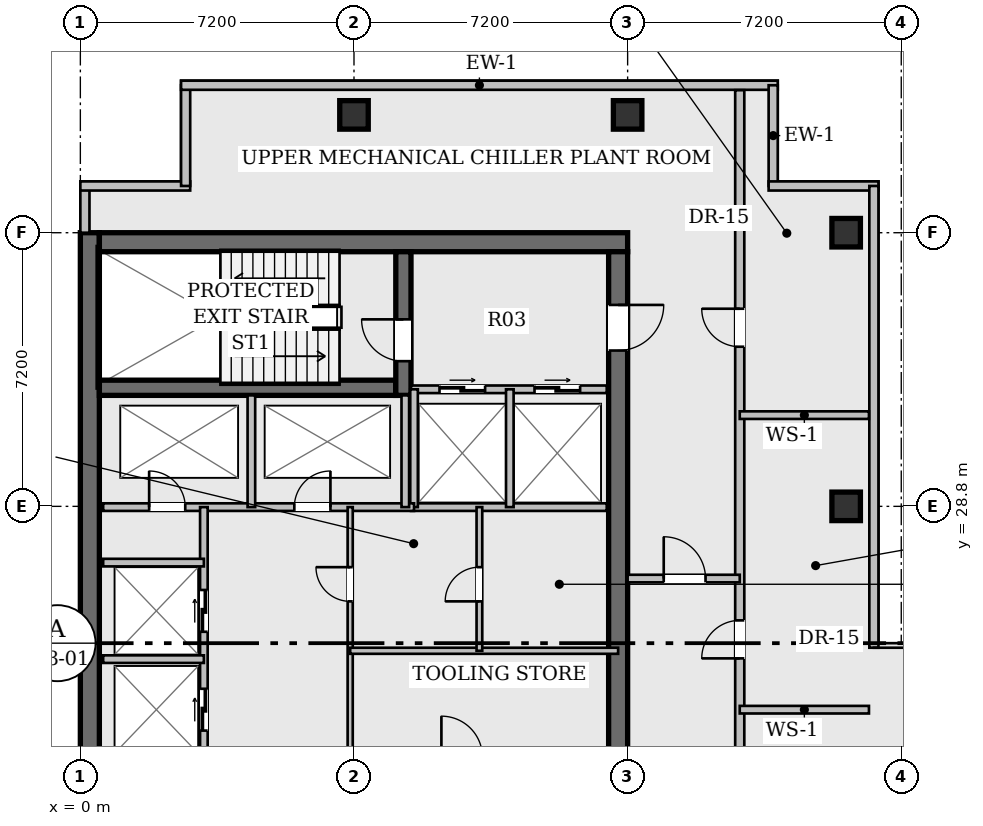
"""IFC4 building model, lengths in metres.
Left out: names, types, materials, properties, quantities, classifications, styles, units other than length and angle.
Written with IfcOpenShell. Run it as: python <this file> out.ifc"""

import sys

from ifc_helpers import new_model, si_unit, direction, frame, frame_2d, origin, origin_2d, place, context, subcontext, project, spatial, rectangle, hollow_rectangle, extrude, element, fill, save


model = new_model("IFC4")
c1 = context("Model", 3, precision=1e-05, world=origin(), true_north=direction((0.0, 1.0)))
c2 = subcontext(c1, "Body", "Model", "MODEL_VIEW")
j1 = project(units=[si_unit("LENGTHUNIT", "METRE"), si_unit("PLANEANGLEUNIT", "RADIAN")], contexts=[c1])
p1 = place(None, origin())
s1 = spatial("IfcSite", under=j1, at=p1, CompositionType="ELEMENT")
p2 = place(p1, origin())
s2 = spatial("IfcBuilding", under=s1, at=p2, CompositionType="ELEMENT")
p3 = place(p2, frame((0.0, 0.0, 236.95)))
s3 = spatial("IfcBuildingStorey", under=s2, at=p3, CompositionType="ELEMENT", Elevation=236.95)
p4 = place(p3, frame((0.25, 7.2, 0.0), z_axis=(0.0, 0.0, 1.0), x_axis=(0.0, 1.0, 0.0)))
e1 = element("IfcWall", 1, at=p4, inside=s3, PredefinedType="SHEAR", context=c2, shape_type="SweptSolid", body=[
    extrude(rectangle(XDim=28.8, YDim=0.5, at=frame_2d((14.4, 0.0))), origin(), (0.0, 0.0, 1.0), 3.94),
])
p5 = place(p3, frame((0.5, 35.75, 0.0), z_axis=(0.0, 0.0, 1.0), x_axis=(1.0, 0.0, 0.0)))
e2 = element("IfcWall", 2, at=p5, inside=s3, PredefinedType="SHEAR", context=c2, shape_type="SweptSolid", body=[
    extrude(rectangle(XDim=13.9, YDim=0.5, at=frame_2d((6.95, 0.0))), origin(), (0.0, 0.0, 1.0), 3.94),
])
p6 = place(p3, frame((14.15, 35.5, 0.0), z_axis=(0.0, 0.0, 1.0), x_axis=(0.0, -1.0, 0.0)))
e3 = element("IfcWall", 3, at=p6, inside=s3, PredefinedType="SHEAR", context=c2, shape_type="SweptSolid", body=[
    extrude(rectangle(XDim=27.8, YDim=0.5, at=frame_2d((13.9, 0.0))), origin(), (0.0, 0.0, 1.0), 3.94),
])
p7 = place(p6, frame((1.4, 0.0, 0.0)))
e4 = element("IfcOpeningElement", 4, at=p7, cuts=e3, PredefinedType="OPENING", context=c2, shape_type="SweptSolid", body=[
    extrude(rectangle(XDim=1.2, YDim=2.15, at=frame_2d((0.6, 1.075))), frame((0.0, 0.262, 0.0), z_axis=(0.0, -1.0, 0.0), x_axis=(1.0, 0.0, 0.0)), (0.0, 0.0, 1.0), 0.524),
])
p8 = place(p6, frame((25.35, 0.0, 0.0)))
e5 = element("IfcOpeningElement", 5, at=p8, cuts=e3, PredefinedType="OPENING", context=c2, shape_type="SweptSolid", body=[
    extrude(rectangle(XDim=1.2, YDim=2.15, at=frame_2d((0.6, 1.075))), frame((0.0, 0.262, 0.0), z_axis=(0.0, -1.0, 0.0), x_axis=(1.0, 0.0, 0.0)), (0.0, 0.0, 1.0), 0.524),
])
p9 = place(p6, frame((14.7, 0.0, 0.0)))
e6 = element("IfcOpeningElement", 6, at=p9, cuts=e3, PredefinedType="OPENING", context=c2, shape_type="SweptSolid", body=[
    extrude(rectangle(XDim=1.6, YDim=2.2, at=frame_2d((0.8, 1.1))), frame((0.0, 0.262, 0.0), z_axis=(0.0, -1.0, 0.0), x_axis=(1.0, 0.0, 0.0)), (0.0, 0.0, 1.0), 0.524),
])
p10 = place(p3, frame((0.5, 31.92, 0.0), z_axis=(0.0, 0.0, 1.0), x_axis=(1.0, 0.0, 0.0)))
e7 = element("IfcWall", 7, at=p10, inside=s3, PredefinedType="SHEAR", context=c2, shape_type="SweptSolid", body=[
    extrude(rectangle(XDim=7.8, YDim=0.4, at=frame_2d((3.9, 0.0))), origin(), (0.0, 0.0, 1.0), 3.94),
])
p11 = place(p3, frame((8.5, 31.72, 0.0), z_axis=(0.0, 0.0, 1.0), x_axis=(0.0, 1.0, 0.0)))
e8 = element("IfcWall", 8, at=p11, inside=s3, PredefinedType="SHEAR", context=c2, shape_type="SweptSolid", body=[
    extrude(rectangle(XDim=3.78, YDim=0.4, at=frame_2d((1.89, 0.0))), origin(), (0.0, 0.0, 1.0), 3.94),
])
p12 = place(p11, frame((0.9, 0.0, 0.0)))
e9 = element("IfcOpeningElement", 9, at=p12, cuts=e8, PredefinedType="OPENING", context=c2, shape_type="SweptSolid", body=[
    extrude(rectangle(XDim=1.1, YDim=2.15, at=frame_2d((0.55, 1.075))), frame((0.0, 0.212, 0.0), z_axis=(0.0, -1.0, 0.0), x_axis=(1.0, 0.0, 0.0)), (0.0, 0.0, 1.0), 0.424),
])
for number, where, z_axis, x_axis in (
    (10, (7.2, 39.1, 0.0), (0.0, 0.0, 1.0), (1.0, 0.0, 0.0)),
    (11, (14.4, 39.1, 0.0), (0.0, 0.0, 1.0), (1.0, 0.0, 0.0)),
    (12, (20.15, 28.8, 0.0), (0.0, 0.0, 1.0), (1.0, 0.0, 0.0)),
    (13, (20.15, 36.0, 0.0), (0.0, 0.0, 1.0), (1.0, 0.0, 0.0)),
):
    element("IfcColumn", number, at=place(p3, frame(where, z_axis=z_axis, x_axis=x_axis)), inside=s3, PredefinedType="COLUMN", context=c2, shape_type="SweptSolid", body=[
        extrude(hollow_rectangle(XDim=0.75, YDim=0.75, WallThickness=0.045, at=origin_2d()), origin(), (0.0, 0.0, 1.0), 3.94),
    ])
p13 = place(p3, frame((0.12, 36.0, 0.0), z_axis=(0.0, 0.0, 1.0), x_axis=(0.0, 1.0, 0.0)))
e14 = element("IfcWall", 14, at=p13, inside=s3, PredefinedType="STANDARD", context=c2, shape_type="SweptSolid", body=[
    extrude(rectangle(XDim=1.23, YDim=0.24, at=frame_2d((0.615, 0.0))), origin(), (0.0, 0.0, 1.0), 3.94),
])
p14 = place(p3, frame((0.0, 37.23, 0.0), z_axis=(0.0, 0.0, 1.0), x_axis=(1.0, 0.0, 0.0)))
e15 = element("IfcWall", 15, at=p14, inside=s3, PredefinedType="STANDARD", context=c2, shape_type="SweptSolid", body=[
    extrude(rectangle(XDim=2.89, YDim=0.24, at=frame_2d((1.445, 0.0))), origin(), (0.0, 0.0, 1.0), 3.94),
])
p15 = place(p3, frame((2.77, 37.23, 0.0), z_axis=(0.0, 0.0, 1.0), x_axis=(0.0, 1.0, 0.0)))
e16 = element("IfcWall", 16, at=p15, inside=s3, PredefinedType="STANDARD", context=c2, shape_type="SweptSolid", body=[
    extrude(rectangle(XDim=2.65, YDim=0.24, at=frame_2d((1.325, 0.0))), origin(), (0.0, 0.0, 1.0), 3.94),
])
p16 = place(p3, frame((2.65, 39.88, 0.0), z_axis=(0.0, 0.0, 1.0), x_axis=(1.0, 0.0, 0.0)))
e17 = element("IfcWall", 17, at=p16, inside=s3, PredefinedType="STANDARD", context=c2, shape_type="SweptSolid", body=[
    extrude(rectangle(XDim=15.7, YDim=0.24, at=frame_2d((7.85, 0.0))), origin(), (0.0, 0.0, 1.0), 3.94),
])
p17 = place(p3, frame((18.23, 39.88, 0.0), z_axis=(0.0, 0.0, 1.0), x_axis=(0.0, -1.0, 0.0)))
e18 = element("IfcWall", 18, at=p17, inside=s3, PredefinedType="STANDARD", context=c2, shape_type="SweptSolid", body=[
    extrude(rectangle(XDim=2.65, YDim=0.24, at=frame_2d((1.325, 0.0))), origin(), (0.0, 0.0, 1.0), 3.94),
])
p18 = place(p3, frame((18.11, 37.23, 0.0), z_axis=(0.0, 0.0, 1.0), x_axis=(1.0, 0.0, 0.0)))
e19 = element("IfcWall", 19, at=p18, inside=s3, PredefinedType="STANDARD", context=c2, shape_type="SweptSolid", body=[
    extrude(rectangle(XDim=2.89, YDim=0.24, at=frame_2d((1.445, 0.0))), origin(), (0.0, 0.0, 1.0), 3.94),
])
p19 = place(p3, frame((20.88, 37.23, 0.0), z_axis=(0.0, 0.0, 1.0), x_axis=(0.0, -1.0, 0.0)))
e20 = element("IfcWall", 20, at=p19, inside=s3, PredefinedType="STANDARD", context=c2, shape_type="SweptSolid", body=[
    extrude(rectangle(XDim=12.15, YDim=0.24, at=frame_2d((6.075, 0.0))), origin(), (0.0, 0.0, 1.0), 3.94),
])
p20 = place(p3, frame((8.7, 31.88, 0.0), z_axis=(0.0, 0.0, 1.0), x_axis=(1.0, 0.0, 0.0)))
e21 = element("IfcWall", 21, at=p20, inside=s3, PredefinedType="PARTITIONING", context=c2, shape_type="SweptSolid", body=[
    extrude(rectangle(XDim=5.15, YDim=0.2, at=frame_2d((2.575, 0.0))), origin(), (0.0, 0.0, 1.0), 3.94),
])
p21 = place(p20, frame((0.75, 0.0, 0.0)))
e22 = element("IfcOpeningElement", 22, at=p21, cuts=e21, PredefinedType="OPENING", context=c2, shape_type="SweptSolid", body=[
    extrude(rectangle(XDim=1.2, YDim=2.2, at=frame_2d((0.6, 1.1))), frame((0.0, 0.112, 0.0), z_axis=(0.0, -1.0, 0.0), x_axis=(1.0, 0.0, 0.0)), (0.0, 0.0, 1.0), 0.224),
])
p22 = place(p20, frame((3.25, 0.0, 0.0)))
e23 = element("IfcOpeningElement", 23, at=p22, cuts=e21, PredefinedType="OPENING", context=c2, shape_type="SweptSolid", body=[
    extrude(rectangle(XDim=1.2, YDim=2.2, at=frame_2d((0.6, 1.1))), frame((0.0, 0.112, 0.0), z_axis=(0.0, -1.0, 0.0), x_axis=(1.0, 0.0, 0.0)), (0.0, 0.0, 1.0), 0.224),
])
p23 = place(p3, frame((8.7, 28.78, 0.0), z_axis=(0.0, 0.0, 1.0), x_axis=(1.0, 0.0, 0.0)))
e24 = element("IfcWall", 24, at=p23, inside=s3, PredefinedType="PARTITIONING", context=c2, shape_type="SweptSolid", body=[
    extrude(rectangle(XDim=5.15, YDim=0.2, at=frame_2d((2.575, 0.0))), origin(), (0.0, 0.0, 1.0), 3.94),
])
for number, where, z_axis, x_axis in (
    (25, (8.78, 28.78, 0.0), (0.0, 0.0, 1.0), (0.0, 1.0, 0.0)),
    (26, (11.3, 28.78, 0.0), (0.0, 0.0, 1.0), (0.0, 1.0, 0.0)),
):
    element("IfcWall", number, at=place(p3, frame(where, z_axis=z_axis, x_axis=x_axis)), inside=s3, PredefinedType="PARTITIONING", context=c2, shape_type="SweptSolid", body=[
        extrude(rectangle(XDim=3.1, YDim=0.2, at=frame_2d((1.55, 0.0))), origin(), (0.0, 0.0, 1.0), 3.94),
    ])
p24 = place(p3, frame((0.6, 28.78, 0.0), z_axis=(0.0, 0.0, 1.0), x_axis=(1.0, 0.0, 0.0)))
e27 = element("IfcWall", 27, at=p24, inside=s3, PredefinedType="PARTITIONING", context=c2, shape_type="SweptSolid", body=[
    extrude(rectangle(XDim=8.18, YDim=0.2, at=frame_2d((4.09, 0.0))), origin(), (0.0, 0.0, 1.0), 3.94),
])
p25 = place(p24, frame((1.21, 0.0, 0.0)))
e28 = element("IfcOpeningElement", 28, at=p25, cuts=e27, PredefinedType="OPENING", context=c2, shape_type="SweptSolid", body=[
    extrude(rectangle(XDim=0.95, YDim=2.15, at=frame_2d((0.475, 1.075))), frame((0.0, 0.112, 0.0), z_axis=(0.0, -1.0, 0.0), x_axis=(1.0, 0.0, 0.0)), (0.0, 0.0, 1.0), 0.224),
])
p26 = place(p24, frame((5.03, 0.0, 0.0)))
e29 = element("IfcOpeningElement", 29, at=p26, cuts=e27, PredefinedType="OPENING", context=c2, shape_type="SweptSolid", body=[
    extrude(rectangle(XDim=0.95, YDim=2.15, at=frame_2d((0.475, 1.075))), frame((0.0, 0.112, 0.0), z_axis=(0.0, -1.0, 0.0), x_axis=(1.0, 0.0, 0.0)), (0.0, 0.0, 1.0), 0.224),
])
for number, where, z_axis, x_axis in (
    (30, (4.5, 28.78, 0.0), (0.0, 0.0, 1.0), (0.0, 1.0, 0.0)),
    (31, (8.55, 28.78, 0.0), (0.0, 0.0, 1.0), (0.0, 1.0, 0.0)),
):
    element("IfcWall", number, at=place(p3, frame(where, z_axis=z_axis, x_axis=x_axis)), inside=s3, PredefinedType="PARTITIONING", context=c2, shape_type="SweptSolid", body=[
        extrude(rectangle(XDim=2.94, YDim=0.2, at=frame_2d((1.47, 0.0))), origin(), (0.0, 0.0, 1.0), 3.94),
    ])
p27 = place(p3, frame((3.25, 15.7, 0.0), z_axis=(0.0, 0.0, 1.0), x_axis=(0.0, 1.0, 0.0)))
e32 = element("IfcWall", 32, at=p27, inside=s3, PredefinedType="PARTITIONING", context=c2, shape_type="SweptSolid", body=[
    extrude(rectangle(XDim=13.08, YDim=0.2, at=frame_2d((6.54, 0.0))), origin(), (0.0, 0.0, 1.0), 3.94),
])
p28 = place(p27, frame((0.9, 0.0, 0.0)))
e33 = element("IfcOpeningElement", 33, at=p28, cuts=e32, PredefinedType="OPENING", context=c2, shape_type="SweptSolid", body=[
    extrude(rectangle(XDim=1.1, YDim=2.2, at=frame_2d((0.55, 1.1))), frame((0.0, 0.112, 0.0), z_axis=(0.0, -1.0, 0.0), x_axis=(1.0, 0.0, 0.0)), (0.0, 0.0, 1.0), 0.224),
])
p29 = place(p27, frame((3.5, 0.0, 0.0)))
e34 = element("IfcOpeningElement", 34, at=p29, cuts=e32, PredefinedType="OPENING", context=c2, shape_type="SweptSolid", body=[
    extrude(rectangle(XDim=1.1, YDim=2.2, at=frame_2d((0.55, 1.1))), frame((0.0, 0.112, 0.0), z_axis=(0.0, -1.0, 0.0), x_axis=(1.0, 0.0, 0.0)), (0.0, 0.0, 1.0), 0.224),
])
p30 = place(p27, frame((7.2, 0.0, 0.0)))
e35 = element("IfcOpeningElement", 35, at=p30, cuts=e32, PredefinedType="OPENING", context=c2, shape_type="SweptSolid", body=[
    extrude(rectangle(XDim=1.1, YDim=2.2, at=frame_2d((0.55, 1.1))), frame((0.0, 0.112, 0.0), z_axis=(0.0, -1.0, 0.0), x_axis=(1.0, 0.0, 0.0)), (0.0, 0.0, 1.0), 0.224),
])
p31 = place(p27, frame((9.8, 0.0, 0.0)))
e36 = element("IfcOpeningElement", 36, at=p31, cuts=e32, PredefinedType="OPENING", context=c2, shape_type="SweptSolid", body=[
    extrude(rectangle(XDim=1.1, YDim=2.2, at=frame_2d((0.55, 1.1))), frame((0.0, 0.112, 0.0), z_axis=(0.0, -1.0, 0.0), x_axis=(1.0, 0.0, 0.0)), (0.0, 0.0, 1.0), 0.224),
])
for number, where, z_axis, x_axis in (
    (37, (0.6, 24.78, 0.0), (0.0, 0.0, 1.0), (1.0, 0.0, 0.0)),
    (38, (0.6, 27.32, 0.0), (0.0, 0.0, 1.0), (1.0, 0.0, 0.0)),
):
    element("IfcWall", number, at=place(p3, frame(where, z_axis=z_axis, x_axis=x_axis)), inside=s3, PredefinedType="PARTITIONING", context=c2, shape_type="SweptSolid", body=[
        extrude(rectangle(XDim=2.65, YDim=0.2, at=frame_2d((1.325, 0.0))), origin(), (0.0, 0.0, 1.0), 3.94),
    ])
p32 = place(p3, frame((7.1, 22.2, 0.0), z_axis=(0.0, 0.0, 1.0), x_axis=(0.0, 1.0, 0.0)))
e39 = element("IfcWall", 39, at=p32, inside=s3, PredefinedType="PARTITIONING", context=c2, shape_type="SweptSolid", body=[
    extrude(rectangle(XDim=6.58, YDim=0.135, at=frame_2d((3.29, 0.0))), origin(), (0.0, 0.0, 1.0), 3.94),
])
p33 = place(p32, frame((4.1, 0.0, 0.0)))
e40 = element("IfcOpeningElement", 40, at=p33, cuts=e39, PredefinedType="OPENING", context=c2, shape_type="SweptSolid", body=[
    extrude(rectangle(XDim=0.9, YDim=2.15, at=frame_2d((0.45, 1.075))), frame((0.0, 0.08, 0.0), z_axis=(0.0, -1.0, 0.0), x_axis=(1.0, 0.0, 0.0)), (0.0, 0.0, 1.0), 0.159),
])
p34 = place(p3, frame((7.1, 25.0, 0.0), z_axis=(0.0, 0.0, 1.0), x_axis=(1.0, 0.0, 0.0)))
e41 = element("IfcWall", 41, at=p34, inside=s3, PredefinedType="PARTITIONING", context=c2, shape_type="SweptSolid", body=[
    extrude(rectangle(XDim=7.05, YDim=0.16, at=frame_2d((3.525, 0.0))), origin(), (0.0, 0.0, 1.0), 3.94),
])
p35 = place(p3, frame((10.5, 25.0, 0.0), z_axis=(0.0, 0.0, 1.0), x_axis=(0.0, 1.0, 0.0)))
e42 = element("IfcWall", 42, at=p35, inside=s3, PredefinedType="PARTITIONING", context=c2, shape_type="SweptSolid", body=[
    extrude(rectangle(XDim=3.78, YDim=0.15, at=frame_2d((1.89, 0.0))), origin(), (0.0, 0.0, 1.0), 3.94),
])
p36 = place(p35, frame((1.3, 0.0, 0.0)))
e43 = element("IfcOpeningElement", 43, at=p36, cuts=e42, PredefinedType="OPENING", context=c2, shape_type="SweptSolid", body=[
    extrude(rectangle(XDim=0.9, YDim=2.15, at=frame_2d((0.45, 1.075))), frame((0.0, 0.087, 0.0), z_axis=(0.0, -1.0, 0.0), x_axis=(1.0, 0.0, 0.0)), (0.0, 0.0, 1.0), 0.174),
])
p37 = place(p3, frame((17.35, 6.55, 0.0), z_axis=(0.0, 0.0, 1.0), x_axis=(0.0, 1.0, 0.0)))
e44 = element("IfcWall", 44, at=p37, inside=s3, PredefinedType="STANDARD", context=c2, shape_type="SweptSolid", body=[
    extrude(rectangle(XDim=33.2, YDim=0.24, at=frame_2d((16.6, 0.0))), origin(), (0.0, 0.0, 1.0), 3.376),
])
p38 = place(p37, frame((26.45, 0.0, 0.0)))
e45 = element("IfcOpeningElement", 45, at=p38, cuts=e44, PredefinedType="OPENING", context=c2, shape_type="SweptSolid", body=[
    extrude(rectangle(XDim=1.0, YDim=2.15, at=frame_2d((0.5, 1.075))), frame((0.0, 0.132, 0.0), z_axis=(0.0, -1.0, 0.0), x_axis=(1.0, 0.0, 0.0)), (0.0, 0.0, 1.0), 0.264),
])
p39 = place(p37, frame((18.25, 0.0, 0.0)))
e46 = element("IfcOpeningElement", 46, at=p39, cuts=e44, PredefinedType="OPENING", context=c2, shape_type="SweptSolid", body=[
    extrude(rectangle(XDim=1.0, YDim=2.15, at=frame_2d((0.5, 1.075))), frame((0.0, 0.132, 0.0), z_axis=(0.0, -1.0, 0.0), x_axis=(1.0, 0.0, 0.0)), (0.0, 0.0, 1.0), 0.264),
])
p40 = place(p37, frame((9.05, 0.0, 0.0)))
e47 = element("IfcOpeningElement", 47, at=p40, cuts=e44, PredefinedType="OPENING", context=c2, shape_type="SweptSolid", body=[
    extrude(rectangle(XDim=1.1, YDim=2.15, at=frame_2d((0.55, 1.075))), frame((0.0, 0.132, 0.0), z_axis=(0.0, -1.0, 0.0), x_axis=(1.0, 0.0, 0.0)), (0.0, 0.0, 1.0), 0.264),
])
p41 = place(p3, frame((14.4, 26.9, 0.0), z_axis=(0.0, 0.0, 1.0), x_axis=(1.0, 0.0, 0.0)))
e48 = element("IfcWall", 48, at=p41, inside=s3, PredefinedType="PARTITIONING", context=c2, shape_type="SweptSolid", body=[
    extrude(rectangle(XDim=2.95, YDim=0.2, at=frame_2d((1.475, 0.0))), origin(), (0.0, 0.0, 1.0), 3.508),
])
p42 = place(p41, frame((0.95, 0.0, 0.0)))
e49 = element("IfcOpeningElement", 49, at=p42, cuts=e48, PredefinedType="OPENING", context=c2, shape_type="SweptSolid", body=[
    extrude(rectangle(XDim=1.1, YDim=2.15, at=frame_2d((0.55, 1.075))), frame((0.0, 0.112, 0.0), z_axis=(0.0, -1.0, 0.0), x_axis=(1.0, 0.0, 0.0)), (0.0, 0.0, 1.0), 0.224),
])
for number, where, z_axis, x_axis in (
    (50, (17.35, 23.45, 0.0), (0.0, 0.0, 1.0), (1.0, 0.0, 0.0)),
    (51, (17.35, 31.2, 0.0), (0.0, 0.0, 1.0), (1.0, 0.0, 0.0)),
):
    element("IfcWall", number, at=place(p3, frame(where, z_axis=z_axis, x_axis=x_axis)), inside=s3, PredefinedType="PARTITIONING", context=c2, shape_type="SweptSolid", body=[
        extrude(rectangle(XDim=3.4, YDim=0.2, at=frame_2d((1.7, 0.0))), origin(), (0.0, 0.0, 1.0), 3.508),
    ])
p43 = place(p12, origin())
e52 = element("IfcDoor", 52, at=p43, inside=s3, OperationType="SINGLE_SWING_RIGHT", PredefinedType="DOOR", context=c2, shape_type="SweptSolid", body=[
    extrude(rectangle(XDim=1.1, YDim=2.15, at=frame_2d((0.55, 1.075))), frame((0.0, 0.025, 0.0), z_axis=(0.0, -1.0, 0.0), x_axis=(1.0, 0.0, 0.0)), (0.0, 0.0, 1.0), 0.05),
])
fill(e9, e52)
p44 = place(p7, origin())
e53 = element("IfcDoor", 53, at=p44, inside=s3, OperationType="SINGLE_SWING_LEFT", PredefinedType="DOOR", context=c2, shape_type="SweptSolid", body=[
    extrude(rectangle(XDim=1.2, YDim=2.15, at=frame_2d((0.6, 1.075))), frame((0.0, 0.025, 0.0), z_axis=(0.0, -1.0, 0.0), x_axis=(1.0, 0.0, 0.0)), (0.0, 0.0, 1.0), 0.05),
])
fill(e4, e53)
p45 = place(p21, origin())
e54 = element("IfcDoor", 54, at=p45, inside=s3, OperationType="DOUBLE_DOOR_SLIDING", PredefinedType="DOOR", context=c2, shape_type="SweptSolid", body=[
    extrude(rectangle(XDim=1.2, YDim=2.2, at=frame_2d((0.6, 1.1))), frame((0.0, 0.025, 0.0), z_axis=(0.0, -1.0, 0.0), x_axis=(1.0, 0.0, 0.0)), (0.0, 0.0, 1.0), 0.05),
])
fill(e22, e54)
p46 = place(p22, origin())
e55 = element("IfcDoor", 55, at=p46, inside=s3, OperationType="DOUBLE_DOOR_SLIDING", PredefinedType="DOOR", context=c2, shape_type="SweptSolid", body=[
    extrude(rectangle(XDim=1.2, YDim=2.2, at=frame_2d((0.6, 1.1))), frame((0.0, 0.025, 0.0), z_axis=(0.0, -1.0, 0.0), x_axis=(1.0, 0.0, 0.0)), (0.0, 0.0, 1.0), 0.05),
])
fill(e23, e55)
p47 = place(p25, origin())
e56 = element("IfcDoor", 56, at=p47, inside=s3, OperationType="SINGLE_SWING_LEFT", PredefinedType="DOOR", context=c2, shape_type="SweptSolid", body=[
    extrude(rectangle(XDim=0.95, YDim=2.15, at=frame_2d((0.475, 1.075))), frame((0.0, 0.025, 0.0), z_axis=(0.0, -1.0, 0.0), x_axis=(1.0, 0.0, 0.0)), (0.0, 0.0, 1.0), 0.05),
])
fill(e28, e56)
p48 = place(p26, origin())
e57 = element("IfcDoor", 57, at=p48, inside=s3, OperationType="SINGLE_SWING_RIGHT", PredefinedType="DOOR", context=c2, shape_type="SweptSolid", body=[
    extrude(rectangle(XDim=0.95, YDim=2.15, at=frame_2d((0.475, 1.075))), frame((0.0, 0.025, 0.0), z_axis=(0.0, -1.0, 0.0), x_axis=(1.0, 0.0, 0.0)), (0.0, 0.0, 1.0), 0.05),
])
fill(e29, e57)
p49 = place(p30, origin())
e58 = element("IfcDoor", 58, at=p49, inside=s3, OperationType="DOUBLE_DOOR_SLIDING", PredefinedType="DOOR", context=c2, shape_type="SweptSolid", body=[
    extrude(rectangle(XDim=1.1, YDim=2.2, at=frame_2d((0.55, 1.1))), frame((0.0, 0.025, 0.0), z_axis=(0.0, -1.0, 0.0), x_axis=(1.0, 0.0, 0.0)), (0.0, 0.0, 1.0), 0.05),
])
fill(e35, e58)
p50 = place(p31, origin())
e59 = element("IfcDoor", 59, at=p50, inside=s3, OperationType="DOUBLE_DOOR_SLIDING", PredefinedType="DOOR", context=c2, shape_type="SweptSolid", body=[
    extrude(rectangle(XDim=1.1, YDim=2.2, at=frame_2d((0.55, 1.1))), frame((0.0, 0.025, 0.0), z_axis=(0.0, -1.0, 0.0), x_axis=(1.0, 0.0, 0.0)), (0.0, 0.0, 1.0), 0.05),
])
fill(e36, e59)
p51 = place(p33, origin())
e60 = element("IfcDoor", 60, at=p51, inside=s3, OperationType="SINGLE_SWING_RIGHT", PredefinedType="DOOR", context=c2, shape_type="SweptSolid", body=[
    extrude(rectangle(XDim=0.9, YDim=2.15, at=frame_2d((0.45, 1.075))), frame((0.0, 0.025, 0.0), z_axis=(0.0, -1.0, 0.0), x_axis=(1.0, 0.0, 0.0)), (0.0, 0.0, 1.0), 0.05),
])
fill(e40, e60)
p52 = place(p36, origin())
e61 = element("IfcDoor", 61, at=p52, inside=s3, OperationType="SINGLE_SWING_LEFT", PredefinedType="DOOR", context=c2, shape_type="SweptSolid", body=[
    extrude(rectangle(XDim=0.9, YDim=2.15, at=frame_2d((0.45, 1.075))), frame((0.0, 0.025, 0.0), z_axis=(0.0, -1.0, 0.0), x_axis=(1.0, 0.0, 0.0)), (0.0, 0.0, 1.0), 0.05),
])
fill(e43, e61)
p53 = place(p42, origin())
e62 = element("IfcDoor", 62, at=p53, inside=s3, OperationType="SINGLE_SWING_LEFT", PredefinedType="DOOR", context=c2, shape_type="SweptSolid", body=[
    extrude(rectangle(XDim=1.1, YDim=2.15, at=frame_2d((0.55, 1.075))), frame((0.0, 0.025, 0.0), z_axis=(0.0, -1.0, 0.0), x_axis=(1.0, 0.0, 0.0)), (0.0, 0.0, 1.0), 0.05),
])
fill(e49, e62)
p54 = place(p38, origin())
e63 = element("IfcDoor", 63, at=p54, inside=s3, OperationType="SINGLE_SWING_RIGHT", PredefinedType="DOOR", context=c2, shape_type="SweptSolid", body=[
    extrude(rectangle(XDim=1.0, YDim=2.15, at=frame_2d((0.5, 1.075))), frame((0.0, 0.025, 0.0), z_axis=(0.0, -1.0, 0.0), x_axis=(1.0, 0.0, 0.0)), (0.0, 0.0, 1.0), 0.05),
])
fill(e45, e63)
p55 = place(p39, origin())
e64 = element("IfcDoor", 64, at=p55, inside=s3, OperationType="SINGLE_SWING_LEFT", PredefinedType="DOOR", context=c2, shape_type="SweptSolid", body=[
    extrude(rectangle(XDim=1.0, YDim=2.15, at=frame_2d((0.5, 1.075))), frame((0.0, 0.025, 0.0), z_axis=(0.0, -1.0, 0.0), x_axis=(1.0, 0.0, 0.0)), (0.0, 0.0, 1.0), 0.05),
])
fill(e46, e64)
save(model, sys.argv[1])
